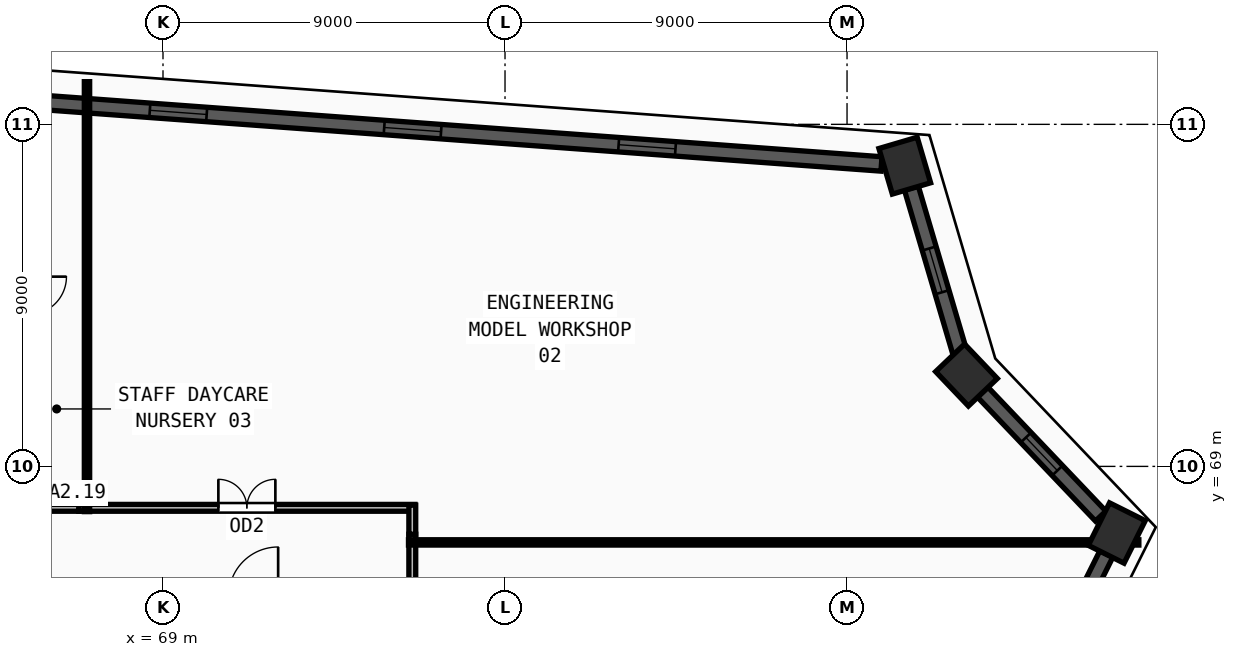
"""IFC4 building model, lengths in metres.
Left out: names, types, materials, properties, quantities, classifications, styles, units other than length and angle.
Written with IfcOpenShell. Run it as: python <this file> out.ifc"""

import sys

from ifc_helpers import new_model, si_unit, direction, frame, frame_2d, origin, origin_2d, place, context, subcontext, project, spatial, rectangle, extrude, source, transform, mapped, element, fill, save


model = new_model("IFC4")
c1 = context("Model", 3, precision=1e-05, world=origin(), true_north=direction((0.0, 1.0)))
c2 = subcontext(c1, "Body", "Model", "MODEL_VIEW")
j1 = project(units=[si_unit("LENGTHUNIT", "METRE"), si_unit("PLANEANGLEUNIT", "RADIAN")], contexts=[c1])
p1 = place(None, origin())
s1 = spatial("IfcSite", under=j1, at=p1, CompositionType="ELEMENT")
p2 = place(p1, origin())
s2 = spatial("IfcBuilding", under=s1, at=p2, CompositionType="ELEMENT")
p3 = place(p2, frame((0.0, 0.0, 194.25)))
s3 = spatial("IfcBuildingStorey", under=s2, at=p3, CompositionType="ELEMENT", Elevation=194.25)
m1 = source(origin(), c2, "Body", "SweptSolid", [
    extrude(rectangle(XDim=1.25, YDim=1.05, at=origin_2d()), origin(), (0.0, 0.0, 1.0), 3.75),
])
for number, where, z_axis, x_axis in (
    (1, (88.519, 76.913, 0.0), (0.0, 0.0, 1.0), (-0.283, 0.959, 0.0)),
    (2, (90.143, 71.403, 0.0), (0.0, 0.0, 1.0), (-0.689, 0.724, 0.0)),
    (3, (94.098, 67.247, 0.0), (0.0, 0.0, 1.0), (0.446, 0.895, 0.0)),
):
    element("IfcColumn", number, at=place(p3, frame(where, z_axis=z_axis, x_axis=x_axis)), inside=s3, PredefinedType="COLUMN", context=c2, shape_type="MappedRepresentation", body=[
        mapped(m1, transform((0.0, 0.0, 0.0), x_axis=(1.0, 0.0, 0.0), y_axis=(0.0, 1.0, 0.0), z_axis=(0.0, 0.0, 1.0), scale=1.0)),
    ])
p4 = place(p3, frame((80.452, 39.875, 0.0), z_axis=(0.0, 0.0, 1.0), x_axis=(0.446173861236, 0.894946303166, 0.0)))
e4 = element("IfcWall", 4, at=p4, inside=s3, PredefinedType="SOLIDWALL", context=c2, shape_type="SweptSolid", body=[
    extrude(rectangle(XDim=29.97, YDim=0.38, at=frame_2d((14.985, 0.0))), origin(), (0.0, 0.0, 1.0), 3.57),
])
m2 = source(origin(), c2, "Body", "SweptSolid", [
    extrude(rectangle(XDim=1.5, YDim=1.9, at=frame_2d((0.75, 0.95))), frame((0.0, 0.2, 0.0), z_axis=(0.0, -1.0, 0.0), x_axis=(1.0, 0.0, 0.0)), (0.0, 0.0, 1.0), 0.4),
])
p5 = place(p4, frame((8.943, 0.0, 0.55)))
e5 = element("IfcOpeningElement", 5, at=p5, cuts=e4, PredefinedType="OPENING", context=c2, shape_type="MappedRepresentation", body=[
    mapped(m2, transform((0.0, 0.0, 0.0), x_axis=(1.0, 0.0, 0.0), y_axis=(0.0, 1.0, 0.0), z_axis=(0.0, 0.0, 1.0), scale=1.0)),
])
p6 = place(p4, frame((14.235, 0.0, 0.55)))
e6 = element("IfcOpeningElement", 6, at=p6, cuts=e4, PredefinedType="OPENING", context=c2, shape_type="MappedRepresentation", body=[
    mapped(m2, transform((0.0, 0.0, 0.0), x_axis=(1.0, 0.0, 0.0), y_axis=(0.0, 1.0, 0.0), z_axis=(0.0, 0.0, 1.0), scale=1.0)),
])
p7 = place(p4, frame((21.728, 0.0, 0.55)))
e7 = element("IfcOpeningElement", 7, at=p7, cuts=e4, PredefinedType="OPENING", context=c2, shape_type="MappedRepresentation", body=[
    mapped(m2, transform((0.0, 0.0, 0.0), x_axis=(1.0, 0.0, 0.0), y_axis=(0.0, 1.0, 0.0), z_axis=(0.0, 0.0, 1.0), scale=1.0)),
])
p8 = place(p3, frame((93.674, 67.693, 0.0), z_axis=(0.0, 0.0, 1.0), x_axis=(-0.689502290867, 0.724283501737, 0.0)))
e8 = element("IfcWall", 8, at=p8, inside=s3, PredefinedType="SOLIDWALL", context=c2, shape_type="SweptSolid", body=[
    extrude(rectangle(XDim=4.506, YDim=0.38, at=frame_2d((2.253, 0.0))), origin(), (0.0, 0.0, 1.0), 3.57),
])
m3 = source(origin(), c2, "Body", "SweptSolid", [
    extrude(rectangle(XDim=1.2, YDim=1.9, at=frame_2d((0.6, 0.95))), frame((0.0, 0.2, 0.0), z_axis=(0.0, -1.0, 0.0), x_axis=(1.0, 0.0, 0.0)), (0.0, 0.0, 1.0), 0.4),
])
p9 = place(p8, frame((1.653, 0.0, 0.55)))
e9 = element("IfcOpeningElement", 9, at=p9, cuts=e8, PredefinedType="OPENING", context=c2, shape_type="MappedRepresentation", body=[
    mapped(m3, transform((0.0, 0.0, 0.0), x_axis=(1.0, 0.0, 0.0), y_axis=(0.0, 1.0, 0.0), z_axis=(0.0, 0.0, 1.0), scale=1.0)),
])
p10 = place(p3, frame((89.969, 71.993, 0.0), z_axis=(0.0, 0.0, 1.0), x_axis=(-0.28264064014, 0.959225869408, 0.0)))
e10 = element("IfcWall", 10, at=p10, inside=s3, PredefinedType="SOLIDWALL", context=c2, shape_type="SweptSolid", body=[
    extrude(rectangle(XDim=4.514, YDim=0.38, at=frame_2d((2.257, 0.0))), origin(), (0.0, 0.0, 1.0), 3.57),
])
p11 = place(p10, frame((1.657, 0.0, 0.55)))
e11 = element("IfcOpeningElement", 11, at=p11, cuts=e10, PredefinedType="OPENING", context=c2, shape_type="MappedRepresentation", body=[
    mapped(m3, transform((0.0, 0.0, 0.0), x_axis=(1.0, 0.0, 0.0), y_axis=(0.0, 1.0, 0.0), z_axis=(0.0, 0.0, 1.0), scale=1.0)),
])
p12 = place(p3, frame((87.906, 76.958, 0.0), z_axis=(0.0, 0.0, 1.0), x_axis=(-0.997322728454, 0.073125749971, 0.0)))
e12 = element("IfcWall", 12, at=p12, inside=s3, PredefinedType="SOLIDWALL", context=c2, shape_type="SweptSolid", body=[
    extrude(rectangle(XDim=24.739, YDim=0.38, at=frame_2d((12.37, 0.0))), origin(), (0.0, 0.0, 1.0), 3.57),
])
p13 = place(p12, frame((5.435, 0.0, 0.55)))
e13 = element("IfcOpeningElement", 13, at=p13, cuts=e12, PredefinedType="OPENING", context=c2, shape_type="MappedRepresentation", body=[
    mapped(m2, transform((0.0, 0.0, 0.0), x_axis=(1.0, 0.0, 0.0), y_axis=(0.0, 1.0, 0.0), z_axis=(0.0, 0.0, 1.0), scale=1.0)),
])
p14 = place(p12, frame((11.62, 0.0, 0.55)))
e14 = element("IfcOpeningElement", 14, at=p14, cuts=e12, PredefinedType="OPENING", context=c2, shape_type="MappedRepresentation", body=[
    mapped(m2, transform((0.0, 0.0, 0.0), x_axis=(1.0, 0.0, 0.0), y_axis=(0.0, 1.0, 0.0), z_axis=(0.0, 0.0, 1.0), scale=1.0)),
])
p15 = place(p12, frame((17.804, 0.0, 0.55)))
e15 = element("IfcOpeningElement", 15, at=p15, cuts=e12, PredefinedType="OPENING", context=c2, shape_type="MappedRepresentation", body=[
    mapped(m2, transform((0.0, 0.0, 0.0), x_axis=(1.0, 0.0, 0.0), y_axis=(0.0, 1.0, 0.0), z_axis=(0.0, 0.0, 1.0), scale=1.0)),
])
p16 = place(p3, frame((75.56, 67.215, 0.0), z_axis=(0.0, 0.0, 1.0), x_axis=(0.0, -1.0, 0.0)))
e16 = element("IfcWall", 16, at=p16, inside=s3, PredefinedType="PARTITIONING", context=c2, shape_type="SweptSolid", body=[
    extrude(rectangle(XDim=8.93, YDim=0.18, at=frame_2d((4.465, 0.0))), origin(), (0.0, 0.0, 1.0), 3.57),
])
m4 = source(origin(), c2, "Body", "SweptSolid", [
    extrude(rectangle(XDim=1.5, YDim=2.2, at=frame_2d((0.75, 1.1))), frame((0.0, 0.1, 0.0), z_axis=(0.0, -1.0, 0.0), x_axis=(1.0, 0.0, 0.0)), (0.0, 0.0, 1.0), 0.2),
])
p17 = place(p16, frame((3.715, 0.0, 0.0)))
e17 = element("IfcOpeningElement", 17, at=p17, cuts=e16, PredefinedType="OPENING", context=c2, shape_type="MappedRepresentation", body=[
    mapped(m4, transform((0.0, 0.0, 0.0), x_axis=(1.0, 0.0, 0.0), y_axis=(0.0, 1.0, 0.0), z_axis=(0.0, 0.0, 1.0), scale=1.0)),
])
p18 = place(p3, frame((66.785, 67.91, 0.0), z_axis=(0.0, 0.0, 1.0), x_axis=(1.0, 0.0, 0.0)))
e18 = element("IfcWall", 18, at=p18, inside=s3, PredefinedType="PARTITIONING", context=c2, shape_type="SweptSolid", body=[
    extrude(rectangle(XDim=8.845, YDim=0.18, at=frame_2d((4.422, 0.0))), origin(), (0.0, 0.0, 1.0), 3.57),
])
p19 = place(p18, frame((3.672, 0.0, 0.0)))
e19 = element("IfcOpeningElement", 19, at=p19, cuts=e18, PredefinedType="OPENING", context=c2, shape_type="MappedRepresentation", body=[
    mapped(m4, transform((0.0, 0.0, 0.0), x_axis=(1.0, 0.0, 0.0), y_axis=(0.0, 1.0, 0.0), z_axis=(0.0, 0.0, 1.0), scale=1.0)),
])
p20 = place(p3, frame((75.56, 67.98, 0.0), z_axis=(0.0, 0.0, 1.0), x_axis=(0.0, -1.0, 0.0)))
e20 = element("IfcWall", 20, at=p20, inside=s3, PredefinedType="PARTITIONING", context=c2, shape_type="SweptSolid", body=[
    extrude(rectangle(XDim=0.765, YDim=0.18, at=frame_2d((0.382, 0.0))), origin(), (0.0, 0.0, 1.0), 3.57),
])
p21 = place(p3, frame((65.39, 67.91, 0.0), z_axis=(0.0, 0.0, 1.0), x_axis=(1.0, 0.0, 0.0)))
e21 = element("IfcWall", 21, at=p21, inside=s3, PredefinedType="PARTITIONING", context=c2, shape_type="SweptSolid", body=[
    extrude(rectangle(XDim=1.395, YDim=0.18, at=frame_2d((0.698, 0.0))), origin(), (0.0, 0.0, 1.0), 3.57),
])
p22 = place(p3, frame((75.46, 67.0, 0.0), z_axis=(0.0, 0.0, 1.0), x_axis=(1.0, 0.0, 0.0)))
e22 = element("IfcWall", 22, at=p22, inside=s3, PredefinedType="PARTITIONING", context=c2, shape_type="SweptSolid", body=[
    extrude(rectangle(XDim=19.219, YDim=0.14, at=frame_2d((9.609, 0.0))), origin(), (0.0, 0.0, 1.0), 2.855),
])
p23 = place(p3, frame((67.0, 67.81, 0.0), z_axis=(0.0, 0.0, 1.0), x_axis=(0.0, 1.0, 0.0)))
e23 = element("IfcWall", 23, at=p23, inside=s3, PredefinedType="PARTITIONING", context=c2, shape_type="SweptSolid", body=[
    extrude(rectangle(XDim=11.313, YDim=0.14, at=frame_2d((5.656, 0.0))), origin(), (0.0, 0.0, 1.0), 3.57),
])
m5 = source(origin(), c2, "Body", "SweptSolid", [
    extrude(rectangle(XDim=1.2, YDim=1.9, at=frame_2d((0.6, 0.95))), frame((0.0, 0.03, 0.0), z_axis=(0.0, -1.0, 0.0), x_axis=(1.0, 0.0, 0.0)), (0.0, 0.0, 1.0), 0.06),
])
p24 = place(p9, origin())
e24 = element("IfcWindow", 24, at=p24, inside=s3, PartitioningType="SINGLE_PANEL", PredefinedType="WINDOW", context=c2, shape_type="MappedRepresentation", body=[
    mapped(m5, transform((0.0, 0.0, 0.0), x_axis=(1.0, 0.0, 0.0), y_axis=(0.0, 1.0, 0.0), z_axis=(0.0, 0.0, 1.0), scale=1.0)),
])
fill(e9, e24)
p25 = place(p11, origin())
e25 = element("IfcWindow", 25, at=p25, inside=s3, PartitioningType="SINGLE_PANEL", PredefinedType="WINDOW", context=c2, shape_type="MappedRepresentation", body=[
    mapped(m5, transform((0.0, 0.0, 0.0), x_axis=(1.0, 0.0, 0.0), y_axis=(0.0, 1.0, 0.0), z_axis=(0.0, 0.0, 1.0), scale=1.0)),
])
fill(e11, e25)
m6 = source(origin(), c2, "Body", "SweptSolid", [
    extrude(rectangle(XDim=1.5, YDim=1.9, at=frame_2d((0.75, 0.95))), frame((0.0, 0.03, 0.0), z_axis=(0.0, -1.0, 0.0), x_axis=(1.0, 0.0, 0.0)), (0.0, 0.0, 1.0), 0.06),
])
p26 = place(p13, origin())
e26 = element("IfcWindow", 26, at=p26, inside=s3, PartitioningType="DOUBLE_PANEL_VERTICAL", PredefinedType="WINDOW", context=c2, shape_type="MappedRepresentation", body=[
    mapped(m6, transform((0.0, 0.0, 0.0), x_axis=(1.0, 0.0, 0.0), y_axis=(0.0, 1.0, 0.0), z_axis=(0.0, 0.0, 1.0), scale=1.0)),
])
fill(e13, e26)
p27 = place(p14, origin())
e27 = element("IfcWindow", 27, at=p27, inside=s3, PartitioningType="DOUBLE_PANEL_VERTICAL", PredefinedType="WINDOW", context=c2, shape_type="MappedRepresentation", body=[
    mapped(m6, transform((0.0, 0.0, 0.0), x_axis=(1.0, 0.0, 0.0), y_axis=(0.0, 1.0, 0.0), z_axis=(0.0, 0.0, 1.0), scale=1.0)),
])
fill(e14, e27)
p28 = place(p15, origin())
e28 = element("IfcWindow", 28, at=p28, inside=s3, PartitioningType="DOUBLE_PANEL_VERTICAL", PredefinedType="WINDOW", context=c2, shape_type="MappedRepresentation", body=[
    mapped(m6, transform((0.0, 0.0, 0.0), x_axis=(1.0, 0.0, 0.0), y_axis=(0.0, 1.0, 0.0), z_axis=(0.0, 0.0, 1.0), scale=1.0)),
])
fill(e15, e28)
m7 = source(origin(), c2, "Body", "SweptSolid", [
    extrude(rectangle(XDim=1.5, YDim=2.2, at=frame_2d((0.75, 1.1))), frame((0.0, 0.025, 0.0), z_axis=(0.0, -1.0, 0.0), x_axis=(1.0, 0.0, 0.0)), (0.0, 0.0, 1.0), 0.05),
])
p29 = place(p19, origin())
e29 = element("IfcDoor", 29, at=p29, inside=s3, OperationType="DOUBLE_DOOR_SINGLE_SWING", PredefinedType="DOOR", context=c2, shape_type="MappedRepresentation", body=[
    mapped(m7, transform((0.0, 0.0, 0.0), x_axis=(1.0, 0.0, 0.0), y_axis=(0.0, 1.0, 0.0), z_axis=(0.0, 0.0, 1.0), scale=1.0)),
])
fill(e19, e29)
save(model, sys.argv[1])
